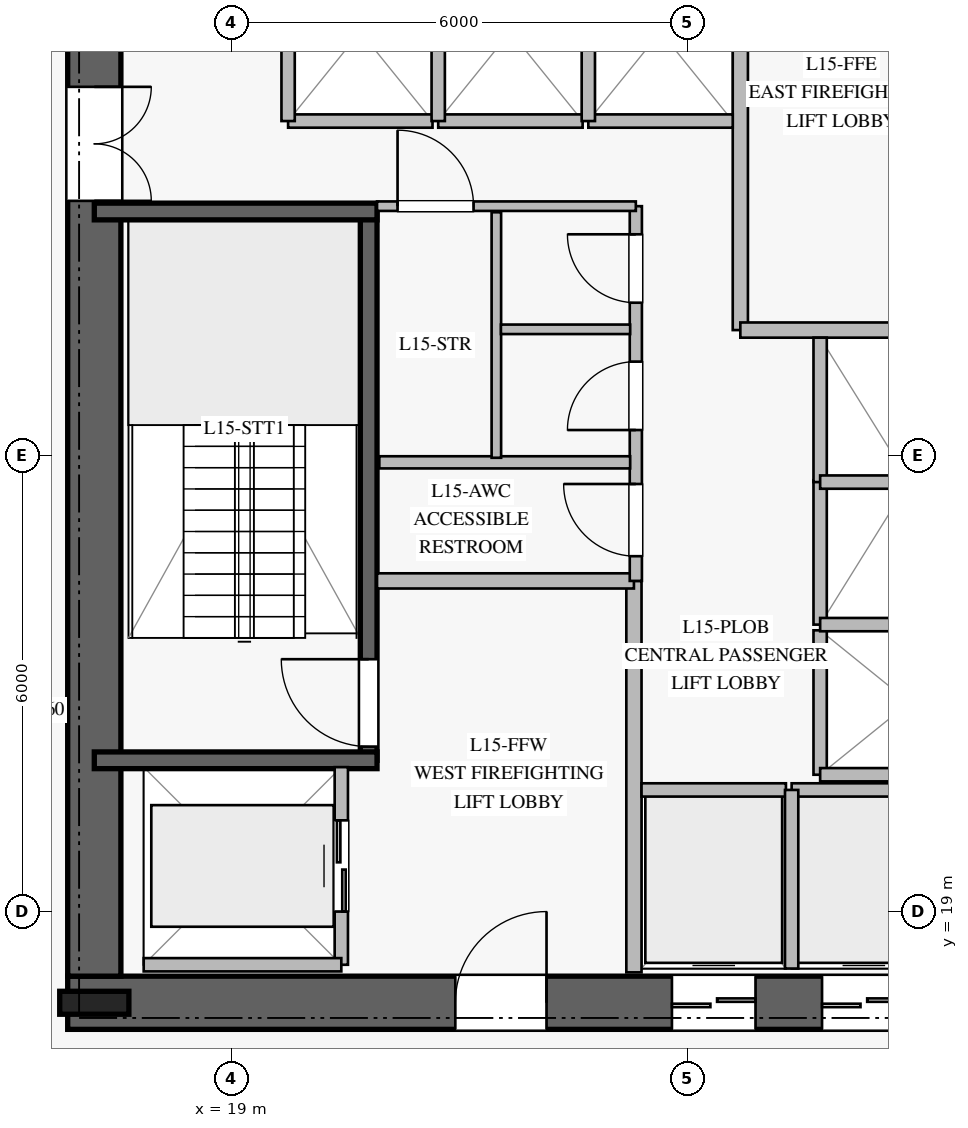
"""IFC4 building model, lengths in metres.
Left out: names, types, materials, properties, quantities, classifications, styles, units other than length and angle.
Written with IfcOpenShell. Run it as: python <this file> out.ifc"""

import sys

from ifc_helpers import new_model, si_unit, direction, frame, frame_2d, origin, origin_2d, place, context, subcontext, project, spatial, rectangle, i_section, extrude, element, fill, save


model = new_model("IFC4")
c1 = context("Model", 3, precision=1e-05, world=origin(), true_north=direction((0.0, 1.0)))
c2 = subcontext(c1, "Body", "Model", "MODEL_VIEW")
j1 = project(units=[si_unit("LENGTHUNIT", "METRE"), si_unit("PLANEANGLEUNIT", "RADIAN")], contexts=[c1])
p1 = place(None, origin())
s1 = spatial("IfcSite", under=j1, at=p1, CompositionType="ELEMENT")
p2 = place(p1, origin())
s2 = spatial("IfcBuilding", under=s1, at=p2, CompositionType="ELEMENT")
p3 = place(p2, frame((0.0, 0.0, 64.0)))
s3 = spatial("IfcBuildingStorey", under=s2, at=p3, CompositionType="ELEMENT", Elevation=64.0)
p4 = place(p3, frame((16.85, 17.8, 0.0), z_axis=(0.0, 0.0, 1.0), x_axis=(1.0, 0.0, 0.0)))
e1 = element("IfcWall", 1, at=p4, inside=s3, PredefinedType="SHEAR", context=c2, shape_type="SweptSolid", body=[
    extrude(rectangle(XDim=16.3, YDim=0.7, at=frame_2d((8.15, 0.0))), origin(), (0.0, 0.0, 1.0), 3.76),
])
p5 = place(p4, frame((5.1, 0.0, 0.0)))
e2 = element("IfcOpeningElement", 2, at=p5, cuts=e1, PredefinedType="OPENING", context=c2, shape_type="SweptSolid", body=[
    extrude(rectangle(XDim=1.2, YDim=2.25, at=frame_2d((0.6, 1.125))), frame((0.0, 0.36, 0.0), z_axis=(0.0, -1.0, 0.0), x_axis=(1.0, 0.0, 0.0)), (0.0, 0.0, 1.0), 0.72),
])
p6 = place(p4, frame((14.05, 0.0, 0.0)))
e3 = element("IfcOpeningElement", 3, at=p6, cuts=e1, PredefinedType="OPENING", context=c2, shape_type="SweptSolid", body=[
    extrude(rectangle(XDim=0.9, YDim=2.1, at=frame_2d((0.45, 1.05))), frame((0.0, 0.36, 0.0), z_axis=(0.0, -1.0, 0.0), x_axis=(1.0, 0.0, 0.0)), (0.0, 0.0, 1.0), 0.72),
])
p7 = place(p4, frame((7.95, 0.0, 0.0)))
e4 = element("IfcOpeningElement", 4, at=p7, cuts=e1, PredefinedType="OPENING", context=c2, shape_type="SweptSolid", body=[
    extrude(rectangle(XDim=1.1, YDim=2.2, at=frame_2d((0.55, 1.1))), frame((0.0, 0.36, 0.0), z_axis=(0.0, -1.0, 0.0), x_axis=(1.0, 0.0, 0.0)), (0.0, 0.0, 1.0), 0.72),
])
p8 = place(p4, frame((9.925, 0.0, 0.0)))
e5 = element("IfcOpeningElement", 5, at=p8, cuts=e1, PredefinedType="OPENING", context=c2, shape_type="SweptSolid", body=[
    extrude(rectangle(XDim=1.1, YDim=2.2, at=frame_2d((0.55, 1.1))), frame((0.0, 0.36, 0.0), z_axis=(0.0, -1.0, 0.0), x_axis=(1.0, 0.0, 0.0)), (0.0, 0.0, 1.0), 0.72),
])
p9 = place(p4, frame((11.9, 0.0, 0.0)))
e6 = element("IfcOpeningElement", 6, at=p9, cuts=e1, PredefinedType="OPENING", context=c2, shape_type="SweptSolid", body=[
    extrude(rectangle(XDim=1.1, YDim=2.2, at=frame_2d((0.55, 1.1))), frame((0.0, 0.36, 0.0), z_axis=(0.0, -1.0, 0.0), x_axis=(1.0, 0.0, 0.0)), (0.0, 0.0, 1.0), 0.72),
])
p10 = place(p3, frame((17.2, 31.85, 0.0), z_axis=(0.0, 0.0, 1.0), x_axis=(0.0, -1.0, 0.0)))
e7 = element("IfcWall", 7, at=p10, inside=s3, PredefinedType="SHEAR", context=c2, shape_type="SweptSolid", body=[
    extrude(rectangle(XDim=13.7, YDim=0.7, at=frame_2d((6.85, 0.0))), origin(), (0.0, 0.0, 1.0), 3.76),
])
p11 = place(p10, frame((2.0, 0.0, 0.0)))
e8 = element("IfcOpeningElement", 8, at=p11, cuts=e7, PredefinedType="OPENING", context=c2, shape_type="SweptSolid", body=[
    extrude(rectangle(XDim=1.5, YDim=2.2, at=frame_2d((0.75, 1.1))), frame((0.0, 0.36, 0.0), z_axis=(0.0, -1.0, 0.0), x_axis=(1.0, 0.0, 0.0)), (0.0, 0.0, 1.0), 0.72),
])
p12 = place(p3, frame((17.2, 17.8, 0.0), z_axis=(0.0, 0.0, 1.0), x_axis=(1.0, 0.0, 0.0)))
e9 = element("IfcColumn", 9, at=p12, inside=s3, PredefinedType="COLUMN", context=c2, shape_type="SweptSolid", body=[
    extrude(i_section(OverallWidth=0.302, OverallDepth=0.91, WebThickness=0.021, FlangeThickness=0.04, at=origin_2d()), origin(), (0.0, 0.0, 1.0), 4.0),
])
p13 = place(p3, frame((20.81, 20.99, 0.0), z_axis=(0.0, 0.0, 1.0), x_axis=(0.0, 1.0, 0.0)))
e10 = element("IfcWall", 10, at=p13, inside=s3, PredefinedType="SOLIDWALL", context=c2, shape_type="SweptSolid", body=[
    extrude(rectangle(XDim=7.22, YDim=0.22, at=frame_2d((3.61, 0.0))), origin(), (0.0, 0.0, 1.0), 3.76),
])
p14 = place(p13, frame((0.18, 0.0, 0.0)))
e11 = element("IfcOpeningElement", 11, at=p14, cuts=e10, PredefinedType="OPENING", context=c2, shape_type="SweptSolid", body=[
    extrude(rectangle(XDim=1.15, YDim=2.2, at=frame_2d((0.575, 1.1))), frame((0.0, 0.12, 0.0), z_axis=(0.0, -1.0, 0.0), x_axis=(1.0, 0.0, 0.0)), (0.0, 0.0, 1.0), 0.24),
])
for number, where, z_axis, x_axis in (
    (12, (17.2, 20.99, 0.0), (0.0, 0.0, 1.0), (1.0, 0.0, 0.0)),
    (13, (17.2, 28.21, 0.0), (0.0, 0.0, 1.0), (1.0, 0.0, 0.0)),
):
    element("IfcWall", number, at=place(p3, frame(where, z_axis=z_axis, x_axis=x_axis)), inside=s3, PredefinedType="SOLIDWALL", context=c2, shape_type="SweptSolid", body=[
        extrude(rectangle(XDim=3.72, YDim=0.22, at=frame_2d((1.86, 0.0))), origin(), (0.0, 0.0, 1.0), 3.76),
    ])
p15 = place(p3, frame((24.3, 18.2, 0.0), z_axis=(0.0, 0.0, 1.0), x_axis=(0.0, 1.0, 0.0)))
e14 = element("IfcWall", 14, at=p15, inside=s3, PredefinedType="PARTITIONING", context=c2, shape_type="SweptSolid", body=[
    extrude(rectangle(XDim=5.15, YDim=0.2, at=frame_2d((2.575, 0.0))), origin(), (0.0, 0.0, 1.0), 3.76),
])
p16 = place(p3, frame((20.92, 23.35, 0.0), z_axis=(0.0, 0.0, 1.0), x_axis=(1.0, 0.0, 0.0)))
e15 = element("IfcWall", 15, at=p16, inside=s3, PredefinedType="PARTITIONING", context=c2, shape_type="SweptSolid", body=[
    extrude(rectangle(XDim=3.38, YDim=0.2, at=frame_2d((1.69, 0.0))), origin(), (0.0, 0.0, 1.0), 3.76),
])
p17 = place(p3, frame((25.7, 26.65, 0.0), z_axis=(0.0, 0.0, 1.0), x_axis=(0.0, 1.0, 0.0)))
e16 = element("IfcWall", 16, at=p17, inside=s3, PredefinedType="PARTITIONING", context=c2, shape_type="SweptSolid", body=[
    extrude(rectangle(XDim=5.15, YDim=0.2, at=frame_2d((2.575, 0.0))), origin(), (0.0, 0.0, 1.0), 3.76),
])
p18 = place(p3, frame((25.7, 26.65, 0.0), z_axis=(0.0, 0.0, 1.0), x_axis=(1.0, 0.0, 0.0)))
e17 = element("IfcWall", 17, at=p18, inside=s3, PredefinedType="PARTITIONING", context=c2, shape_type="SweptSolid", body=[
    extrude(rectangle(XDim=3.38, YDim=0.2, at=frame_2d((1.69, 0.0))), origin(), (0.0, 0.0, 1.0), 3.76),
])
p19 = place(p3, frame((24.325, 23.35, 0.0), z_axis=(0.0, 0.0, 1.0), x_axis=(0.0, 1.0, 0.0)))
e18 = element("IfcWall", 18, at=p19, inside=s3, PredefinedType="PLUMBINGWALL", context=c2, shape_type="SweptSolid", body=[
    extrude(rectangle(XDim=4.93, YDim=0.16, at=frame_2d((2.465, 0.0))), origin(), (0.0, 0.0, 1.0), 3.76),
])
p20 = place(p19, frame((0.325, 0.0, 0.0)))
e19 = element("IfcOpeningElement", 19, at=p20, cuts=e18, PredefinedType="OPENING", context=c2, shape_type="SweptSolid", body=[
    extrude(rectangle(XDim=0.95, YDim=2.1, at=frame_2d((0.475, 1.05))), frame((0.0, 0.09, 0.0), z_axis=(0.0, -1.0, 0.0), x_axis=(1.0, 0.0, 0.0)), (0.0, 0.0, 1.0), 0.18),
])
p21 = place(p19, frame((1.985, 0.0, 0.0)))
e20 = element("IfcOpeningElement", 20, at=p21, cuts=e18, PredefinedType="OPENING", context=c2, shape_type="SweptSolid", body=[
    extrude(rectangle(XDim=0.9, YDim=2.1, at=frame_2d((0.45, 1.05))), frame((0.0, 0.09, 0.0), z_axis=(0.0, -1.0, 0.0), x_axis=(1.0, 0.0, 0.0)), (0.0, 0.0, 1.0), 0.18),
])
p22 = place(p19, frame((3.66, 0.0, 0.0)))
e21 = element("IfcOpeningElement", 21, at=p22, cuts=e18, PredefinedType="OPENING", context=c2, shape_type="SweptSolid", body=[
    extrude(rectangle(XDim=0.9, YDim=2.1, at=frame_2d((0.45, 1.05))), frame((0.0, 0.09, 0.0), z_axis=(0.0, -1.0, 0.0), x_axis=(1.0, 0.0, 0.0)), (0.0, 0.0, 1.0), 0.18),
])
p23 = place(p3, frame((20.92, 28.28, 0.0), z_axis=(0.0, 0.0, 1.0), x_axis=(1.0, 0.0, 0.0)))
e22 = element("IfcWall", 22, at=p23, inside=s3, PredefinedType="PARTITIONING", context=c2, shape_type="SweptSolid", body=[
    extrude(rectangle(XDim=3.405, YDim=0.125, at=frame_2d((1.703, 0.0))), origin(), (0.0, 0.0, 1.0), 3.76),
])
p24 = place(p23, frame((0.27, 0.0, 0.0)))
e23 = element("IfcOpeningElement", 23, at=p24, cuts=e22, PredefinedType="OPENING", context=c2, shape_type="SweptSolid", body=[
    extrude(rectangle(XDim=1.0, YDim=2.15, at=frame_2d((0.5, 1.075))), frame((0.0, 0.073, 0.0), z_axis=(0.0, -1.0, 0.0), x_axis=(1.0, 0.0, 0.0)), (0.0, 0.0, 1.0), 0.145),
])
p25 = place(p3, frame((20.95, 24.91, 0.0), z_axis=(0.0, 0.0, 1.0), x_axis=(1.0, 0.0, 0.0)))
e24 = element("IfcWall", 24, at=p25, inside=s3, PredefinedType="PLUMBINGWALL", context=c2, shape_type="SweptSolid", body=[
    extrude(rectangle(XDim=3.3, YDim=0.16, at=frame_2d((1.65, 0.0))), origin(), (0.0, 0.0, 1.0), 3.76),
])
p26 = place(p3, frame((22.49, 24.97, 0.0), z_axis=(0.0, 0.0, 1.0), x_axis=(0.0, 1.0, 0.0)))
e25 = element("IfcWall", 25, at=p26, inside=s3, PredefinedType="PARTITIONING", context=c2, shape_type="SweptSolid", body=[
    extrude(rectangle(XDim=3.23, YDim=0.125, at=frame_2d((1.615, 0.0))), origin(), (0.0, 0.0, 1.0), 3.76),
])
p27 = place(p3, frame((22.55, 26.66, 0.0), z_axis=(0.0, 0.0, 1.0), x_axis=(1.0, 0.0, 0.0)))
e26 = element("IfcWall", 26, at=p27, inside=s3, PredefinedType="PARTITIONING", context=c2, shape_type="SweptSolid", body=[
    extrude(rectangle(XDim=1.7, YDim=0.125, at=frame_2d((0.85, 0.0))), origin(), (0.0, 0.0, 1.0), 3.76),
])
p28 = place(p3, frame((24.4, 20.6, 0.0), z_axis=(0.0, 0.0, 1.0), x_axis=(1.0, 0.0, 0.0)))
e27 = element("IfcWall", 27, at=p28, inside=s3, PredefinedType="PARTITIONING", context=c2, shape_type="SweptSolid", body=[
    extrude(rectangle(XDim=1.9, YDim=0.175, at=frame_2d((0.95, 0.0))), origin(), (0.0, 0.0, 1.0), 3.76),
])
p29 = place(p3, frame((26.375, 20.6, 0.0), z_axis=(0.0, 0.0, 1.0), x_axis=(1.0, 0.0, 0.0)))
e28 = element("IfcWall", 28, at=p29, inside=s3, PredefinedType="PARTITIONING", context=c2, shape_type="SweptSolid", body=[
    extrude(rectangle(XDim=1.9, YDim=0.175, at=frame_2d((0.95, 0.0))), origin(), (0.0, 0.0, 1.0), 3.76),
])
p30 = place(p3, frame((26.375, 18.25, 0.0), z_axis=(0.0, 0.0, 1.0), x_axis=(0.0, 1.0, 0.0)))
e29 = element("IfcWall", 29, at=p30, inside=s3, PredefinedType="PARTITIONING", context=c2, shape_type="SweptSolid", body=[
    extrude(rectangle(XDim=2.35, YDim=0.175, at=frame_2d((1.175, 0.0))), origin(), (0.0, 0.0, 1.0), 3.76),
])
p31 = place(p3, frame((19.75, 29.4, 0.0), z_axis=(0.0, 0.0, 1.0), x_axis=(1.0, 0.0, 0.0)))
e30 = element("IfcWall", 30, at=p31, inside=s3, PredefinedType="PARTITIONING", context=c2, shape_type="SweptSolid", body=[
    extrude(rectangle(XDim=1.9, YDim=0.175, at=frame_2d((0.95, 0.0))), origin(), (0.0, 0.0, 1.0), 3.76),
])
p32 = place(p3, frame((19.75, 29.4, 0.0), z_axis=(0.0, 0.0, 1.0), x_axis=(0.0, 1.0, 0.0)))
e31 = element("IfcWall", 31, at=p32, inside=s3, PredefinedType="PARTITIONING", context=c2, shape_type="SweptSolid", body=[
    extrude(rectangle(XDim=2.35, YDim=0.175, at=frame_2d((1.175, 0.0))), origin(), (0.0, 0.0, 1.0), 3.76),
])
p33 = place(p3, frame((21.725, 29.4, 0.0), z_axis=(0.0, 0.0, 1.0), x_axis=(1.0, 0.0, 0.0)))
e32 = element("IfcWall", 32, at=p33, inside=s3, PredefinedType="PARTITIONING", context=c2, shape_type="SweptSolid", body=[
    extrude(rectangle(XDim=1.9, YDim=0.175, at=frame_2d((0.95, 0.0))), origin(), (0.0, 0.0, 1.0), 3.76),
])
p34 = place(p3, frame((21.725, 29.4, 0.0), z_axis=(0.0, 0.0, 1.0), x_axis=(0.0, 1.0, 0.0)))
e33 = element("IfcWall", 33, at=p34, inside=s3, PredefinedType="PARTITIONING", context=c2, shape_type="SweptSolid", body=[
    extrude(rectangle(XDim=2.35, YDim=0.175, at=frame_2d((1.175, 0.0))), origin(), (0.0, 0.0, 1.0), 3.76),
])
p35 = place(p3, frame((23.7, 29.4, 0.0), z_axis=(0.0, 0.0, 1.0), x_axis=(1.0, 0.0, 0.0)))
e34 = element("IfcWall", 34, at=p35, inside=s3, PredefinedType="PARTITIONING", context=c2, shape_type="SweptSolid", body=[
    extrude(rectangle(XDim=1.9, YDim=0.175, at=frame_2d((0.95, 0.0))), origin(), (0.0, 0.0, 1.0), 3.76),
])
p36 = place(p3, frame((23.7, 29.4, 0.0), z_axis=(0.0, 0.0, 1.0), x_axis=(0.0, 1.0, 0.0)))
e35 = element("IfcWall", 35, at=p36, inside=s3, PredefinedType="PARTITIONING", context=c2, shape_type="SweptSolid", body=[
    extrude(rectangle(XDim=2.35, YDim=0.175, at=frame_2d((1.175, 0.0))), origin(), (0.0, 0.0, 1.0), 3.76),
])
p37 = place(p3, frame((26.75, 20.8, 0.0), z_axis=(0.0, 0.0, 1.0), x_axis=(0.0, 1.0, 0.0)))
e36 = element("IfcWall", 36, at=p37, inside=s3, PredefinedType="PARTITIONING", context=c2, shape_type="SweptSolid", body=[
    extrude(rectangle(XDim=1.9, YDim=0.175, at=frame_2d((0.95, 0.0))), origin(), (0.0, 0.0, 1.0), 3.76),
])
p38 = place(p3, frame((26.75, 20.8, 0.0), z_axis=(0.0, 0.0, 1.0), x_axis=(1.0, 0.0, 0.0)))
e37 = element("IfcWall", 37, at=p38, inside=s3, PredefinedType="PARTITIONING", context=c2, shape_type="SweptSolid", body=[
    extrude(rectangle(XDim=2.35, YDim=0.175, at=frame_2d((1.175, 0.0))), origin(), (0.0, 0.0, 1.0), 3.76),
])
p39 = place(p3, frame((26.75, 22.775, 0.0), z_axis=(0.0, 0.0, 1.0), x_axis=(0.0, 1.0, 0.0)))
e38 = element("IfcWall", 38, at=p39, inside=s3, PredefinedType="PARTITIONING", context=c2, shape_type="SweptSolid", body=[
    extrude(rectangle(XDim=1.9, YDim=0.175, at=frame_2d((0.95, 0.0))), origin(), (0.0, 0.0, 1.0), 3.76),
])
p40 = place(p3, frame((26.75, 22.775, 0.0), z_axis=(0.0, 0.0, 1.0), x_axis=(1.0, 0.0, 0.0)))
e39 = element("IfcWall", 39, at=p40, inside=s3, PredefinedType="PARTITIONING", context=c2, shape_type="SweptSolid", body=[
    extrude(rectangle(XDim=2.35, YDim=0.175, at=frame_2d((1.175, 0.0))), origin(), (0.0, 0.0, 1.0), 3.76),
])
p41 = place(p3, frame((26.75, 24.65, 0.0), z_axis=(0.0, 0.0, 1.0), x_axis=(0.0, 1.0, 0.0)))
e40 = element("IfcWall", 40, at=p41, inside=s3, PredefinedType="PARTITIONING", context=c2, shape_type="SweptSolid", body=[
    extrude(rectangle(XDim=1.9, YDim=0.175, at=frame_2d((0.95, 0.0))), origin(), (0.0, 0.0, 1.0), 3.76),
])
p42 = place(p3, frame((26.75, 24.65, 0.0), z_axis=(0.0, 0.0, 1.0), x_axis=(1.0, 0.0, 0.0)))
e41 = element("IfcWall", 41, at=p42, inside=s3, PredefinedType="PARTITIONING", context=c2, shape_type="SweptSolid", body=[
    extrude(rectangle(XDim=2.35, YDim=0.175, at=frame_2d((1.175, 0.0))), origin(), (0.0, 0.0, 1.0), 3.76),
])
p43 = place(p3, frame((20.45, 18.3, 0.0), z_axis=(0.0, 0.0, 1.0), x_axis=(0.0, 1.0, 0.0)))
e42 = element("IfcWall", 42, at=p43, inside=s3, PredefinedType="PARTITIONING", context=c2, shape_type="SweptSolid", body=[
    extrude(rectangle(XDim=2.6, YDim=0.175, at=frame_2d((1.3, 0.0))), origin(), (0.0, 0.0, 1.0), 3.76),
])
p44 = place(p43, frame((0.7, 0.0, 0.0)))
e43 = element("IfcOpeningElement", 43, at=p44, cuts=e42, PredefinedType="OPENING", context=c2, shape_type="SweptSolid", body=[
    extrude(rectangle(XDim=1.2, YDim=2.2, at=frame_2d((0.6, 1.1))), frame((0.0, 0.098, 0.0), z_axis=(0.0, -1.0, 0.0), x_axis=(1.0, 0.0, 0.0)), (0.0, 0.0, 1.0), 0.195),
])
p45 = place(p3, frame((17.85, 18.3, 0.0), z_axis=(0.0, 0.0, 1.0), x_axis=(1.0, 0.0, 0.0)))
e44 = element("IfcWall", 44, at=p45, inside=s3, PredefinedType="PARTITIONING", context=c2, shape_type="SweptSolid", body=[
    extrude(rectangle(XDim=2.6, YDim=0.175, at=frame_2d((1.3, 0.0))), origin(), (0.0, 0.0, 1.0), 3.76),
])
p46 = place(p14, origin())
e45 = element("IfcDoor", 45, at=p46, inside=s3, OperationType="SINGLE_SWING_RIGHT", PredefinedType="DOOR", context=c2, shape_type="SweptSolid", body=[
    extrude(rectangle(XDim=1.15, YDim=2.2, at=frame_2d((0.575, 1.1))), frame((0.0, 0.025, 0.0), z_axis=(0.0, -1.0, 0.0), x_axis=(1.0, 0.0, 0.0)), (0.0, 0.0, 1.0), 0.05),
])
fill(e11, e45)
p47 = place(p5, origin())
e46 = element("IfcDoor", 46, at=p47, inside=s3, OperationType="SINGLE_SWING_RIGHT", PredefinedType="DOOR", context=c2, shape_type="SweptSolid", body=[
    extrude(rectangle(XDim=1.2, YDim=2.25, at=frame_2d((0.6, 1.125))), frame((0.0, 0.025, 0.0), z_axis=(0.0, -1.0, 0.0), x_axis=(1.0, 0.0, 0.0)), (0.0, 0.0, 1.0), 0.05),
])
fill(e2, e46)
p48 = place(p11, origin())
e47 = element("IfcDoor", 47, at=p48, inside=s3, OperationType="DOUBLE_DOOR_SINGLE_SWING", PredefinedType="DOOR", context=c2, shape_type="SweptSolid", body=[
    extrude(rectangle(XDim=1.5, YDim=2.2, at=frame_2d((0.75, 1.1))), frame((0.0, 0.025, 0.0), z_axis=(0.0, -1.0, 0.0), x_axis=(1.0, 0.0, 0.0)), (0.0, 0.0, 1.0), 0.05),
])
fill(e8, e47)
p49 = place(p20, origin())
e48 = element("IfcDoor", 48, at=p49, inside=s3, OperationType="SINGLE_SWING_RIGHT", PredefinedType="DOOR", context=c2, shape_type="SweptSolid", body=[
    extrude(rectangle(XDim=0.95, YDim=2.1, at=frame_2d((0.475, 1.05))), frame((0.0, 0.025, 0.0), z_axis=(0.0, -1.0, 0.0), x_axis=(1.0, 0.0, 0.0)), (0.0, 0.0, 1.0), 0.05),
])
fill(e19, e48)
p50 = place(p21, origin())
e49 = element("IfcDoor", 49, at=p50, inside=s3, OperationType="SINGLE_SWING_LEFT", PredefinedType="DOOR", context=c2, shape_type="SweptSolid", body=[
    extrude(rectangle(XDim=0.9, YDim=2.1, at=frame_2d((0.45, 1.05))), frame((0.0, 0.025, 0.0), z_axis=(0.0, -1.0, 0.0), x_axis=(1.0, 0.0, 0.0)), (0.0, 0.0, 1.0), 0.05),
])
fill(e20, e49)
p51 = place(p22, origin())
e50 = element("IfcDoor", 50, at=p51, inside=s3, OperationType="SINGLE_SWING_RIGHT", PredefinedType="DOOR", context=c2, shape_type="SweptSolid", body=[
    extrude(rectangle(XDim=0.9, YDim=2.1, at=frame_2d((0.45, 1.05))), frame((0.0, 0.025, 0.0), z_axis=(0.0, -1.0, 0.0), x_axis=(1.0, 0.0, 0.0)), (0.0, 0.0, 1.0), 0.05),
])
fill(e21, e50)
p52 = place(p24, origin())
e51 = element("IfcDoor", 51, at=p52, inside=s3, OperationType="SINGLE_SWING_LEFT", PredefinedType="DOOR", context=c2, shape_type="SweptSolid", body=[
    extrude(rectangle(XDim=1.0, YDim=2.15, at=frame_2d((0.5, 1.075))), frame((0.0, 0.025, 0.0), z_axis=(0.0, -1.0, 0.0), x_axis=(1.0, 0.0, 0.0)), (0.0, 0.0, 1.0), 0.05),
])
fill(e23, e51)
p53 = place(p7, origin())
e52 = element("IfcDoor", 52, at=p53, inside=s3, OperationType="DOUBLE_DOOR_SLIDING", PredefinedType="DOOR", context=c2, shape_type="SweptSolid", body=[
    extrude(rectangle(XDim=1.1, YDim=2.2, at=frame_2d((0.55, 1.1))), frame((0.0, 0.025, 0.0), z_axis=(0.0, -1.0, 0.0), x_axis=(1.0, 0.0, 0.0)), (0.0, 0.0, 1.0), 0.05),
])
fill(e4, e52)
p54 = place(p8, origin())
e53 = element("IfcDoor", 53, at=p54, inside=s3, OperationType="DOUBLE_DOOR_SLIDING", PredefinedType="DOOR", context=c2, shape_type="SweptSolid", body=[
    extrude(rectangle(XDim=1.1, YDim=2.2, at=frame_2d((0.55, 1.1))), frame((0.0, 0.025, 0.0), z_axis=(0.0, -1.0, 0.0), x_axis=(1.0, 0.0, 0.0)), (0.0, 0.0, 1.0), 0.05),
])
fill(e5, e53)
p55 = place(p44, origin())
e54 = element("IfcDoor", 54, at=p55, inside=s3, OperationType="DOUBLE_DOOR_SLIDING", PredefinedType="DOOR", context=c2, shape_type="SweptSolid", body=[
    extrude(rectangle(XDim=1.2, YDim=2.2, at=frame_2d((0.6, 1.1))), frame((0.0, 0.025, 0.0), z_axis=(0.0, -1.0, 0.0), x_axis=(1.0, 0.0, 0.0)), (0.0, 0.0, 1.0), 0.05),
])
fill(e43, e54)
save(model, sys.argv[1])
